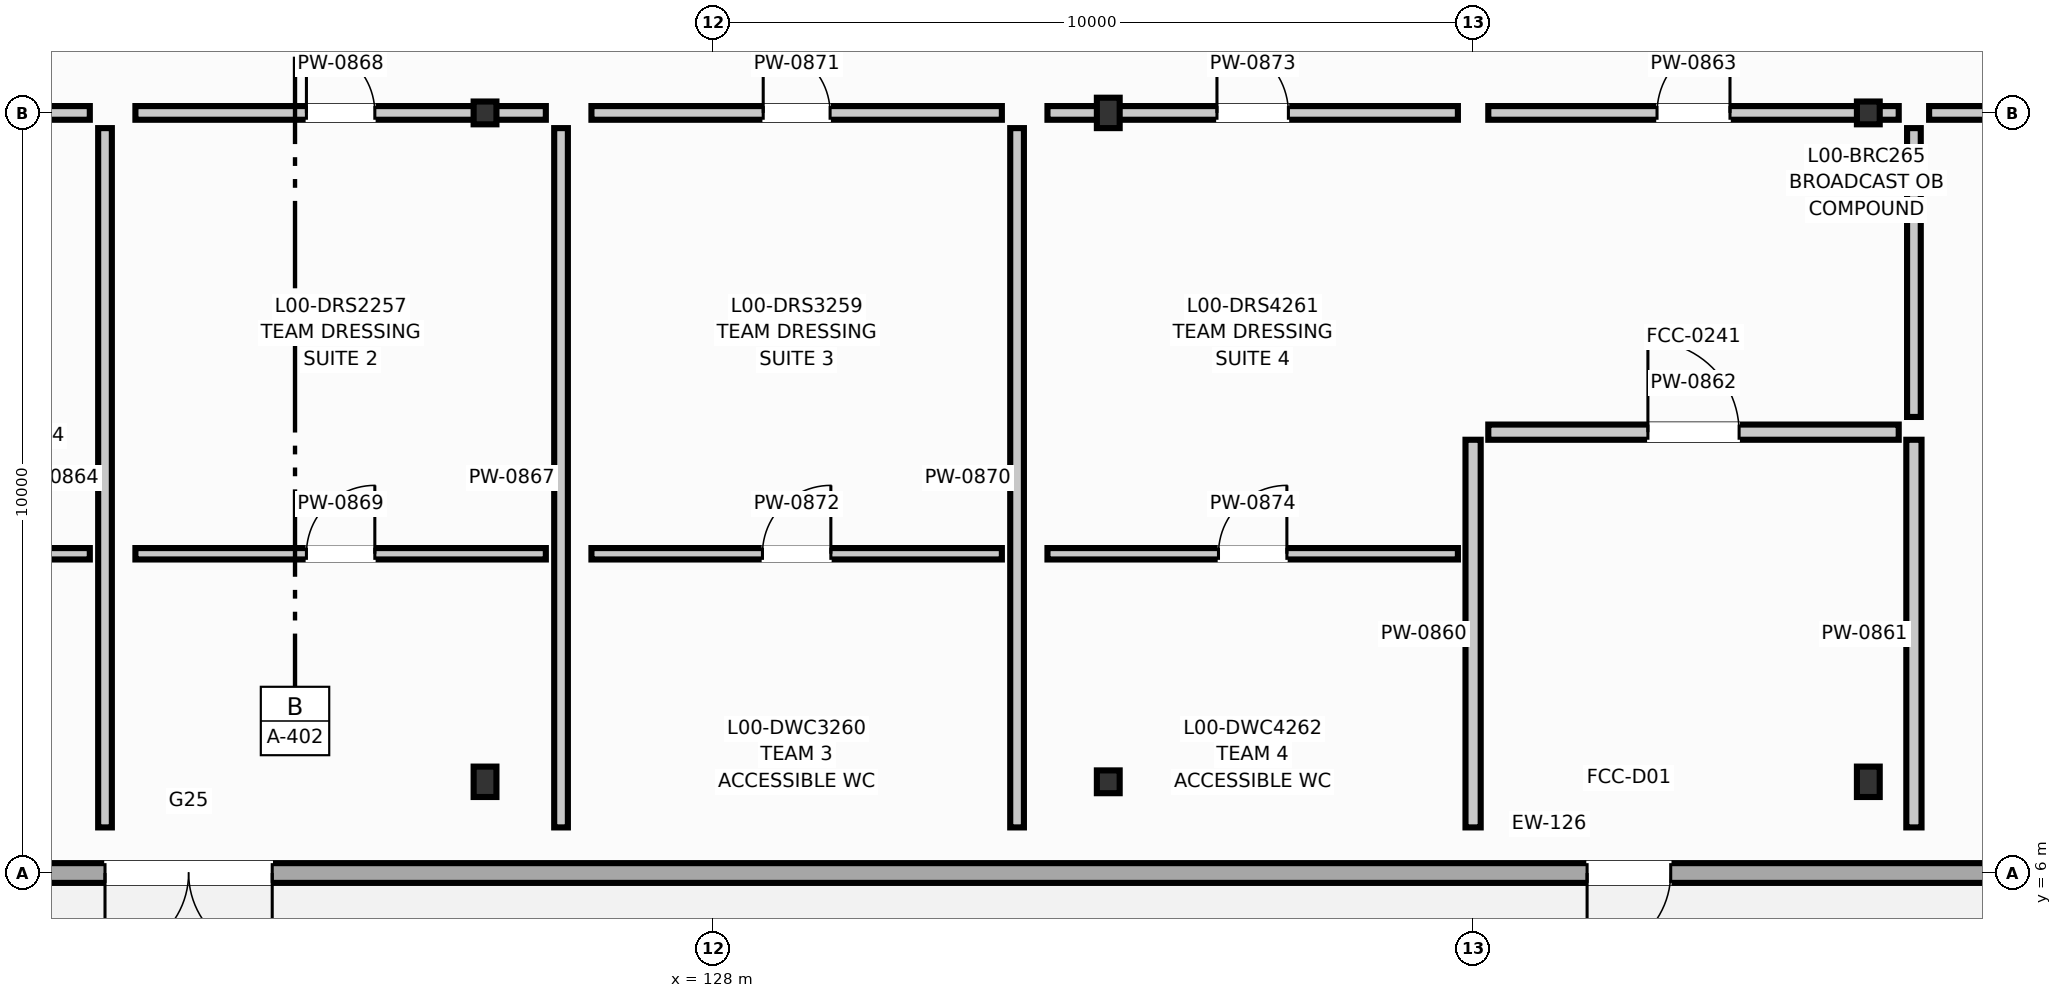
"""IFC4 building model, lengths in metres.
Left out: names, types, materials, properties, quantities, classifications, styles, units other than length and angle.
Written with IfcOpenShell. Run it as: python <this file> out.ifc"""

import sys

from ifc_helpers import new_model, si_unit, direction, frame, frame_2d, origin, origin_2d, place, context, subcontext, project, spatial, rectangle, i_section, extrude, element, fill, save


model = new_model("IFC4")
c1 = context("Model", 3, precision=1e-05, world=origin(), true_north=direction((0.0, 1.0)))
c2 = subcontext(c1, "Body", "Model", "MODEL_VIEW")
j1 = project(units=[si_unit("LENGTHUNIT", "METRE"), si_unit("PLANEANGLEUNIT", "RADIAN")], contexts=[c1])
p1 = place(None, origin())
s1 = spatial("IfcSite", under=j1, at=p1, CompositionType="ELEMENT")
p2 = place(p1, origin())
s2 = spatial("IfcBuilding", under=s1, at=p2, CompositionType="ELEMENT")
p3 = place(p2, origin())
s3 = spatial("IfcBuildingStorey", under=s2, at=p3, CompositionType="ELEMENT", Elevation=0.0)
p4 = place(p3, frame((125.0, 7.2, 0.0), z_axis=(0.0, 0.0, 1.0), x_axis=(1.0, 0.0, 0.0)))
e1 = element("IfcColumn", 1, at=p4, inside=s3, PredefinedType="COLUMN", context=c2, shape_type="SweptSolid", body=[
    extrude(i_section(OverallWidth=0.3, OverallDepth=0.4, WebThickness=0.013, FlangeThickness=0.024, at=origin_2d()), origin(), (0.0, 0.0, 1.0), 4.5),
])
for number, where, z_axis, x_axis in (
    (2, (125.0, 16.0, 0.0), (0.0, 0.0, 1.0), (1.0, 0.0, 0.0)),
    (3, (133.2, 7.2, 0.0), (0.0, 0.0, 1.0), (1.0, 0.0, 0.0)),
):
    element("IfcColumn", number, at=place(p3, frame(where, z_axis=z_axis, x_axis=x_axis)), inside=s3, PredefinedType="COLUMN", context=c2, shape_type="SweptSolid", body=[
        extrude(i_section(OverallWidth=0.3, OverallDepth=0.3, WebThickness=0.011, FlangeThickness=0.019, at=origin_2d()), origin(), (0.0, 0.0, 1.0), 4.5),
    ])
for number, where, z_axis, x_axis in (
    (4, (133.2, 16.0, 0.0), (0.0, 0.0, 1.0), (1.0, 0.0, 0.0)),
    (5, (143.2, 7.2, 0.0), (0.0, 0.0, 1.0), (1.0, 0.0, 0.0)),
):
    element("IfcColumn", number, at=place(p3, frame(where, z_axis=z_axis, x_axis=x_axis)), inside=s3, PredefinedType="COLUMN", context=c2, shape_type="SweptSolid", body=[
        extrude(i_section(OverallWidth=0.3, OverallDepth=0.4, WebThickness=0.013, FlangeThickness=0.024, at=origin_2d()), origin(), (0.0, 0.0, 1.0), 4.5),
    ])
p5 = place(p3, frame((143.2, 16.0, 0.0), z_axis=(0.0, 0.0, 1.0), x_axis=(1.0, 0.0, 0.0)))
e6 = element("IfcColumn", 6, at=p5, inside=s3, PredefinedType="COLUMN", context=c2, shape_type="SweptSolid", body=[
    extrude(i_section(OverallWidth=0.3, OverallDepth=0.3, WebThickness=0.011, FlangeThickness=0.019, at=origin_2d()), origin(), (0.0, 0.0, 1.0), 4.5),
])
p6 = place(p3, frame((114.0, 6.0, 0.0), z_axis=(0.0, 0.0, 1.0), x_axis=(1.0, 0.0, 0.0)))
e7 = element("IfcWall", 7, at=p6, inside=s3, PredefinedType="SOLIDWALL", context=c2, shape_type="SweptSolid", body=[
    extrude(rectangle(XDim=50.0, YDim=0.26, at=frame_2d((25.0, 0.0))), origin(), (0.0, 0.0, 1.0), 3.5),
])
p7 = place(p6, frame((25.5, 0.0, 0.0)))
e8 = element("IfcOpeningElement", 8, at=p7, cuts=e7, PredefinedType="OPENING", context=c2, shape_type="SweptSolid", body=[
    extrude(rectangle(XDim=1.1, YDim=2.25, at=frame_2d((0.55, 1.125))), frame((0.0, 0.14, 0.0), z_axis=(0.0, -1.0, 0.0), x_axis=(1.0, 0.0, 0.0)), (0.0, 0.0, 1.0), 0.28),
])
p8 = place(p6, frame((6.0, 0.0, 0.0)))
e9 = element("IfcOpeningElement", 9, at=p8, cuts=e7, PredefinedType="OPENING", context=c2, shape_type="SweptSolid", body=[
    extrude(rectangle(XDim=2.2, YDim=2.45, at=frame_2d((1.1, 1.225))), frame((0.0, 0.14, 0.0), z_axis=(0.0, -1.0, 0.0), x_axis=(1.0, 0.0, 0.0)), (0.0, 0.0, 1.0), 0.28),
])
p9 = place(p6, frame((36.0, 0.0, 0.0)))
e10 = element("IfcOpeningElement", 10, at=p9, cuts=e7, PredefinedType="OPENING", context=c2, shape_type="SweptSolid", body=[
    extrude(rectangle(XDim=2.2, YDim=2.45, at=frame_2d((1.1, 1.225))), frame((0.0, 0.14, 0.0), z_axis=(0.0, -1.0, 0.0), x_axis=(1.0, 0.0, 0.0)), (0.0, 0.0, 1.0), 0.28),
])
for number, where, z_axis, x_axis in (
    (11, (138.0, 6.6, 0.0), (0.0, 0.0, 1.0), (0.0, 1.0, 0.0)),
    (12, (143.8, 6.6, 0.0), (0.0, 0.0, 1.0), (0.0, 1.0, 0.0)),
):
    element("IfcWall", number, at=place(p3, frame(where, z_axis=z_axis, x_axis=x_axis)), inside=s3, PredefinedType="PARTITIONING", context=c2, shape_type="SweptSolid", body=[
        extrude(rectangle(XDim=5.1, YDim=0.2, at=frame_2d((2.55, 0.0))), origin(), (0.0, 0.0, 1.0), 3.22),
    ])
p10 = place(p3, frame((138.2, 11.8, 0.0), z_axis=(0.0, 0.0, 1.0), x_axis=(1.0, 0.0, 0.0)))
e13 = element("IfcWall", 13, at=p10, inside=s3, PredefinedType="PARTITIONING", context=c2, shape_type="SweptSolid", body=[
    extrude(rectangle(XDim=5.4, YDim=0.2, at=frame_2d((2.7, 0.0))), origin(), (0.0, 0.0, 1.0), 3.22),
])
p11 = place(p10, frame((2.1, 0.0, 0.0)))
e14 = element("IfcOpeningElement", 14, at=p11, cuts=e13, PredefinedType="OPENING", context=c2, shape_type="SweptSolid", body=[
    extrude(rectangle(XDim=1.2, YDim=2.2, at=frame_2d((0.6, 1.1))), frame((0.0, 0.11, 0.0), z_axis=(0.0, -1.0, 0.0), x_axis=(1.0, 0.0, 0.0)), (0.0, 0.0, 1.0), 0.22),
])
p12 = place(p3, frame((138.2, 16.0, 0.0), z_axis=(0.0, 0.0, 1.0), x_axis=(1.0, 0.0, 0.0)))
e15 = element("IfcWall", 15, at=p12, inside=s3, PredefinedType="PARTITIONING", context=c2, shape_type="SweptSolid", body=[
    extrude(rectangle(XDim=5.4, YDim=0.18, at=frame_2d((2.7, 0.0))), origin(), (0.0, 0.0, 1.0), 3.22),
])
p13 = place(p12, frame((2.22, 0.0, 0.0)))
e16 = element("IfcOpeningElement", 16, at=p13, cuts=e15, PredefinedType="OPENING", context=c2, shape_type="SweptSolid", body=[
    extrude(rectangle(XDim=0.96, YDim=2.15, at=frame_2d((0.48, 1.075))), frame((0.0, 0.1, 0.0), z_axis=(0.0, -1.0, 0.0), x_axis=(1.0, 0.0, 0.0)), (0.0, 0.0, 1.0), 0.2),
])
p14 = place(p3, frame((120.0, 6.6, 0.0), z_axis=(0.0, 0.0, 1.0), x_axis=(0.0, 1.0, 0.0)))
e17 = element("IfcWall", 17, at=p14, inside=s3, PredefinedType="PARTITIONING", context=c2, shape_type="SweptSolid", body=[
    extrude(rectangle(XDim=9.2, YDim=0.18, at=frame_2d((4.6, 0.0))), origin(), (0.0, 0.0, 1.0), 3.22),
])
p15 = place(p3, frame((114.4, 16.0, 0.0), z_axis=(0.0, 0.0, 1.0), x_axis=(1.0, 0.0, 0.0)))
e18 = element("IfcWall", 18, at=p15, inside=s3, PredefinedType="PARTITIONING", context=c2, shape_type="SweptSolid", body=[
    extrude(rectangle(XDim=5.4, YDim=0.18, at=frame_2d((2.7, 0.0))), origin(), (0.0, 0.0, 1.0), 3.22),
])
p16 = place(p15, frame((2.24, 0.0, 0.0)))
e19 = element("IfcOpeningElement", 19, at=p16, cuts=e18, PredefinedType="OPENING", context=c2, shape_type="SweptSolid", body=[
    extrude(rectangle(XDim=0.92, YDim=2.1, at=frame_2d((0.46, 1.05))), frame((0.0, 0.1, 0.0), z_axis=(0.0, -1.0, 0.0), x_axis=(1.0, 0.0, 0.0)), (0.0, 0.0, 1.0), 0.2),
])
p17 = place(p3, frame((114.4, 10.2, 0.0), z_axis=(0.0, 0.0, 1.0), x_axis=(1.0, 0.0, 0.0)))
e20 = element("IfcWall", 20, at=p17, inside=s3, PredefinedType="PARTITIONING", context=c2, shape_type="SweptSolid", body=[
    extrude(rectangle(XDim=5.4, YDim=0.15, at=frame_2d((2.7, 0.0))), origin(), (0.0, 0.0, 1.0), 3.22),
])
p18 = place(p17, frame((2.25, 0.0, 0.0)))
e21 = element("IfcOpeningElement", 21, at=p18, cuts=e20, PredefinedType="OPENING", context=c2, shape_type="SweptSolid", body=[
    extrude(rectangle(XDim=0.9, YDim=2.1, at=frame_2d((0.45, 1.05))), frame((0.0, 0.085, 0.0), z_axis=(0.0, -1.0, 0.0), x_axis=(1.0, 0.0, 0.0)), (0.0, 0.0, 1.0), 0.17),
])
p19 = place(p3, frame((126.0, 6.6, 0.0), z_axis=(0.0, 0.0, 1.0), x_axis=(0.0, 1.0, 0.0)))
e22 = element("IfcWall", 22, at=p19, inside=s3, PredefinedType="PARTITIONING", context=c2, shape_type="SweptSolid", body=[
    extrude(rectangle(XDim=9.2, YDim=0.18, at=frame_2d((4.6, 0.0))), origin(), (0.0, 0.0, 1.0), 3.22),
])
p20 = place(p3, frame((120.4, 16.0, 0.0), z_axis=(0.0, 0.0, 1.0), x_axis=(1.0, 0.0, 0.0)))
e23 = element("IfcWall", 23, at=p20, inside=s3, PredefinedType="PARTITIONING", context=c2, shape_type="SweptSolid", body=[
    extrude(rectangle(XDim=5.4, YDim=0.18, at=frame_2d((2.7, 0.0))), origin(), (0.0, 0.0, 1.0), 3.22),
])
p21 = place(p20, frame((2.25, 0.0, 0.0)))
e24 = element("IfcOpeningElement", 24, at=p21, cuts=e23, PredefinedType="OPENING", context=c2, shape_type="SweptSolid", body=[
    extrude(rectangle(XDim=0.9, YDim=2.1, at=frame_2d((0.45, 1.05))), frame((0.0, 0.1, 0.0), z_axis=(0.0, -1.0, 0.0), x_axis=(1.0, 0.0, 0.0)), (0.0, 0.0, 1.0), 0.2),
])
p22 = place(p3, frame((120.4, 10.2, 0.0), z_axis=(0.0, 0.0, 1.0), x_axis=(1.0, 0.0, 0.0)))
e25 = element("IfcWall", 25, at=p22, inside=s3, PredefinedType="PARTITIONING", context=c2, shape_type="SweptSolid", body=[
    extrude(rectangle(XDim=5.4, YDim=0.15, at=frame_2d((2.7, 0.0))), origin(), (0.0, 0.0, 1.0), 3.22),
])
p23 = place(p22, frame((2.25, 0.0, 0.0)))
e26 = element("IfcOpeningElement", 26, at=p23, cuts=e25, PredefinedType="OPENING", context=c2, shape_type="SweptSolid", body=[
    extrude(rectangle(XDim=0.9, YDim=2.1, at=frame_2d((0.45, 1.05))), frame((0.0, 0.085, 0.0), z_axis=(0.0, -1.0, 0.0), x_axis=(1.0, 0.0, 0.0)), (0.0, 0.0, 1.0), 0.17),
])
p24 = place(p3, frame((132.0, 6.6, 0.0), z_axis=(0.0, 0.0, 1.0), x_axis=(0.0, 1.0, 0.0)))
e27 = element("IfcWall", 27, at=p24, inside=s3, PredefinedType="PARTITIONING", context=c2, shape_type="SweptSolid", body=[
    extrude(rectangle(XDim=9.2, YDim=0.18, at=frame_2d((4.6, 0.0))), origin(), (0.0, 0.0, 1.0), 3.22),
])
p25 = place(p3, frame((126.4, 16.0, 0.0), z_axis=(0.0, 0.0, 1.0), x_axis=(1.0, 0.0, 0.0)))
e28 = element("IfcWall", 28, at=p25, inside=s3, PredefinedType="PARTITIONING", context=c2, shape_type="SweptSolid", body=[
    extrude(rectangle(XDim=5.4, YDim=0.18, at=frame_2d((2.7, 0.0))), origin(), (0.0, 0.0, 1.0), 3.22),
])
p26 = place(p25, frame((2.26, 0.0, 0.0)))
e29 = element("IfcOpeningElement", 29, at=p26, cuts=e28, PredefinedType="OPENING", context=c2, shape_type="SweptSolid", body=[
    extrude(rectangle(XDim=0.88, YDim=2.08, at=frame_2d((0.44, 1.04))), frame((0.0, 0.1, 0.0), z_axis=(0.0, -1.0, 0.0), x_axis=(1.0, 0.0, 0.0)), (0.0, 0.0, 1.0), 0.2),
])
p27 = place(p3, frame((126.4, 10.2, 0.0), z_axis=(0.0, 0.0, 1.0), x_axis=(1.0, 0.0, 0.0)))
e30 = element("IfcWall", 30, at=p27, inside=s3, PredefinedType="PARTITIONING", context=c2, shape_type="SweptSolid", body=[
    extrude(rectangle(XDim=5.4, YDim=0.15, at=frame_2d((2.7, 0.0))), origin(), (0.0, 0.0, 1.0), 3.22),
])
p28 = place(p27, frame((2.25, 0.0, 0.0)))
e31 = element("IfcOpeningElement", 31, at=p28, cuts=e30, PredefinedType="OPENING", context=c2, shape_type="SweptSolid", body=[
    extrude(rectangle(XDim=0.9, YDim=2.1, at=frame_2d((0.45, 1.05))), frame((0.0, 0.085, 0.0), z_axis=(0.0, -1.0, 0.0), x_axis=(1.0, 0.0, 0.0)), (0.0, 0.0, 1.0), 0.17),
])
p29 = place(p3, frame((132.4, 16.0, 0.0), z_axis=(0.0, 0.0, 1.0), x_axis=(1.0, 0.0, 0.0)))
e32 = element("IfcWall", 32, at=p29, inside=s3, PredefinedType="PARTITIONING", context=c2, shape_type="SweptSolid", body=[
    extrude(rectangle(XDim=5.4, YDim=0.18, at=frame_2d((2.7, 0.0))), origin(), (0.0, 0.0, 1.0), 3.22),
])
p30 = place(p29, frame((2.23, 0.0, 0.0)))
e33 = element("IfcOpeningElement", 33, at=p30, cuts=e32, PredefinedType="OPENING", context=c2, shape_type="SweptSolid", body=[
    extrude(rectangle(XDim=0.94, YDim=2.12, at=frame_2d((0.47, 1.06))), frame((0.0, 0.1, 0.0), z_axis=(0.0, -1.0, 0.0), x_axis=(1.0, 0.0, 0.0)), (0.0, 0.0, 1.0), 0.2),
])
p31 = place(p3, frame((132.4, 10.2, 0.0), z_axis=(0.0, 0.0, 1.0), x_axis=(1.0, 0.0, 0.0)))
e34 = element("IfcWall", 34, at=p31, inside=s3, PredefinedType="PARTITIONING", context=c2, shape_type="SweptSolid", body=[
    extrude(rectangle(XDim=5.4, YDim=0.15, at=frame_2d((2.7, 0.0))), origin(), (0.0, 0.0, 1.0), 3.22),
])
p32 = place(p31, frame((2.25, 0.0, 0.0)))
e35 = element("IfcOpeningElement", 35, at=p32, cuts=e34, PredefinedType="OPENING", context=c2, shape_type="SweptSolid", body=[
    extrude(rectangle(XDim=0.9, YDim=2.1, at=frame_2d((0.45, 1.05))), frame((0.0, 0.085, 0.0), z_axis=(0.0, -1.0, 0.0), x_axis=(1.0, 0.0, 0.0)), (0.0, 0.0, 1.0), 0.17),
])
p33 = place(p3, frame((143.8, 12.0, 0.0), z_axis=(0.0, 0.0, 1.0), x_axis=(0.0, 1.0, 0.0)))
e36 = element("IfcWall", 36, at=p33, inside=s3, PredefinedType="PARTITIONING", context=c2, shape_type="SweptSolid", body=[
    extrude(rectangle(XDim=3.8, YDim=0.18, at=frame_2d((1.9, 0.0))), origin(), (0.0, 0.0, 1.0), 3.22),
])
p34 = place(p3, frame((144.0, 16.0, 0.0), z_axis=(0.0, 0.0, 1.0), x_axis=(1.0, 0.0, 0.0)))
e37 = element("IfcWall", 37, at=p34, inside=s3, PredefinedType="PARTITIONING", context=c2, shape_type="SweptSolid", body=[
    extrude(rectangle(XDim=9.4, YDim=0.18, at=frame_2d((4.7, 0.0))), origin(), (0.0, 0.0, 1.0), 3.22),
])
p35 = place(p34, frame((4.2, 0.0, 0.0)))
e38 = element("IfcOpeningElement", 38, at=p35, cuts=e37, PredefinedType="OPENING", context=c2, shape_type="SweptSolid", body=[
    extrude(rectangle(XDim=1.0, YDim=2.14, at=frame_2d((0.5, 1.07))), frame((0.0, 0.1, 0.0), z_axis=(0.0, -1.0, 0.0), x_axis=(1.0, 0.0, 0.0)), (0.0, 0.0, 1.0), 0.2),
])
p36 = place(p7, frame((1.1, 0.0, 0.0), z_axis=(0.0, 0.0, 1.0), x_axis=(-1.0, 0.0, 0.0)))
e39 = element("IfcDoor", 39, at=p36, inside=s3, OperationType="SINGLE_SWING_LEFT", PredefinedType="DOOR", context=c2, shape_type="SweptSolid", body=[
    extrude(rectangle(XDim=1.1, YDim=2.25, at=frame_2d((0.55, 1.125))), frame((0.0, 0.025, 0.0), z_axis=(0.0, -1.0, 0.0), x_axis=(1.0, 0.0, 0.0)), (0.0, 0.0, 1.0), 0.05),
])
fill(e8, e39)
p37 = place(p8, frame((2.2, 0.0, 0.0), z_axis=(0.0, 0.0, 1.0), x_axis=(-1.0, 0.0, 0.0)))
e40 = element("IfcDoor", 40, at=p37, inside=s3, OperationType="DOUBLE_DOOR_SINGLE_SWING", PredefinedType="DOOR", context=c2, shape_type="SweptSolid", body=[
    extrude(rectangle(XDim=2.2, YDim=2.45, at=frame_2d((1.1, 1.225))), frame((0.0, 0.025, 0.0), z_axis=(0.0, -1.0, 0.0), x_axis=(1.0, 0.0, 0.0)), (0.0, 0.0, 1.0), 0.05),
])
fill(e9, e40)
p38 = place(p11, origin())
e41 = element("IfcDoor", 41, at=p38, inside=s3, OperationType="SINGLE_SWING_LEFT", PredefinedType="DOOR", context=c2, shape_type="SweptSolid", body=[
    extrude(rectangle(XDim=1.2, YDim=2.2, at=frame_2d((0.6, 1.1))), frame((0.0, 0.025, 0.0), z_axis=(0.0, -1.0, 0.0), x_axis=(1.0, 0.0, 0.0)), (0.0, 0.0, 1.0), 0.05),
])
fill(e14, e41)
p39 = place(p13, origin())
e42 = element("IfcDoor", 42, at=p39, inside=s3, OperationType="SINGLE_SWING_RIGHT", PredefinedType="DOOR", context=c2, shape_type="SweptSolid", body=[
    extrude(rectangle(XDim=0.96, YDim=2.15, at=frame_2d((0.48, 1.075))), frame((0.0, 0.025, 0.0), z_axis=(0.0, -1.0, 0.0), x_axis=(1.0, 0.0, 0.0)), (0.0, 0.0, 1.0), 0.05),
])
fill(e16, e42)
p40 = place(p21, origin())
e43 = element("IfcDoor", 43, at=p40, inside=s3, OperationType="SINGLE_SWING_LEFT", PredefinedType="DOOR", context=c2, shape_type="SweptSolid", body=[
    extrude(rectangle(XDim=0.9, YDim=2.1, at=frame_2d((0.45, 1.05))), frame((0.0, 0.025, 0.0), z_axis=(0.0, -1.0, 0.0), x_axis=(1.0, 0.0, 0.0)), (0.0, 0.0, 1.0), 0.05),
])
fill(e24, e43)
p41 = place(p23, origin())
e44 = element("IfcDoor", 44, at=p41, inside=s3, OperationType="SINGLE_SWING_RIGHT", PredefinedType="DOOR", context=c2, shape_type="SweptSolid", body=[
    extrude(rectangle(XDim=0.9, YDim=2.1, at=frame_2d((0.45, 1.05))), frame((0.0, 0.025, 0.0), z_axis=(0.0, -1.0, 0.0), x_axis=(1.0, 0.0, 0.0)), (0.0, 0.0, 1.0), 0.05),
])
fill(e26, e44)
p42 = place(p26, origin())
e45 = element("IfcDoor", 45, at=p42, inside=s3, OperationType="SINGLE_SWING_LEFT", PredefinedType="DOOR", context=c2, shape_type="SweptSolid", body=[
    extrude(rectangle(XDim=0.88, YDim=2.08, at=frame_2d((0.44, 1.04))), frame((0.0, 0.025, 0.0), z_axis=(0.0, -1.0, 0.0), x_axis=(1.0, 0.0, 0.0)), (0.0, 0.0, 1.0), 0.05),
])
fill(e29, e45)
p43 = place(p28, origin())
e46 = element("IfcDoor", 46, at=p43, inside=s3, OperationType="SINGLE_SWING_RIGHT", PredefinedType="DOOR", context=c2, shape_type="SweptSolid", body=[
    extrude(rectangle(XDim=0.9, YDim=2.1, at=frame_2d((0.45, 1.05))), frame((0.0, 0.025, 0.0), z_axis=(0.0, -1.0, 0.0), x_axis=(1.0, 0.0, 0.0)), (0.0, 0.0, 1.0), 0.05),
])
fill(e31, e46)
p44 = place(p30, origin())
e47 = element("IfcDoor", 47, at=p44, inside=s3, OperationType="SINGLE_SWING_LEFT", PredefinedType="DOOR", context=c2, shape_type="SweptSolid", body=[
    extrude(rectangle(XDim=0.94, YDim=2.12, at=frame_2d((0.47, 1.06))), frame((0.0, 0.025, 0.0), z_axis=(0.0, -1.0, 0.0), x_axis=(1.0, 0.0, 0.0)), (0.0, 0.0, 1.0), 0.05),
])
fill(e33, e47)
p45 = place(p32, origin())
e48 = element("IfcDoor", 48, at=p45, inside=s3, OperationType="SINGLE_SWING_RIGHT", PredefinedType="DOOR", context=c2, shape_type="SweptSolid", body=[
    extrude(rectangle(XDim=0.9, YDim=2.1, at=frame_2d((0.45, 1.05))), frame((0.0, 0.025, 0.0), z_axis=(0.0, -1.0, 0.0), x_axis=(1.0, 0.0, 0.0)), (0.0, 0.0, 1.0), 0.05),
])
fill(e35, e48)
save(model, sys.argv[1])
